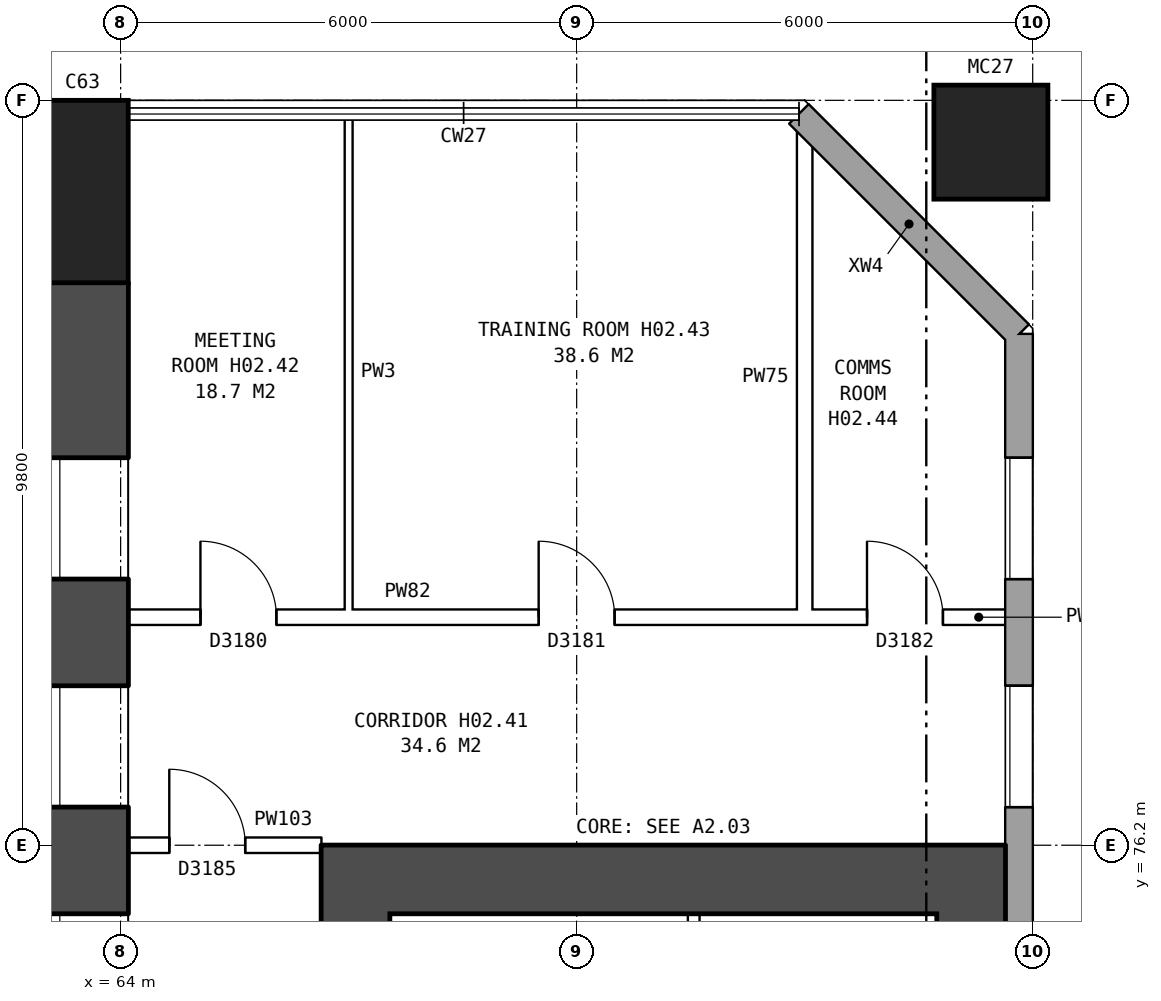
"""IFC4 building model, lengths in metres.
Left out: names, types, materials, properties, quantities, classifications, styles, units other than length and angle.
Written with IfcOpenShell. Run it as: python <this file> out.ifc"""

import sys

from ifc_helpers import new_model, si_unit, direction, frame, frame_2d, origin, origin_2d, place, context, subcontext, project, spatial, rectangle, hollow_rectangle, extrude, element, fill, save


model = new_model("IFC4")
c1 = context("Model", 3, precision=1e-05, world=origin(), true_north=direction((0.0, 1.0)))
c2 = subcontext(c1, "Body", "Model", "MODEL_VIEW")
j1 = project(units=[si_unit("LENGTHUNIT", "METRE"), si_unit("PLANEANGLEUNIT", "RADIAN")], contexts=[c1])
p1 = place(None, origin())
s1 = spatial("IfcSite", under=j1, at=p1, CompositionType="ELEMENT")
p2 = place(p1, origin())
s2 = spatial("IfcBuilding", under=s1, at=p2, CompositionType="ELEMENT")
p3 = place(p2, frame((0.0, 0.0, 10.1)))
s3 = spatial("IfcBuildingStorey", under=s2, at=p3, CompositionType="ELEMENT", Elevation=10.1)
p4 = place(p3, frame((63.5, 84.8, -0.3), z_axis=(0.0, 0.0, 1.0), x_axis=(1.0, 0.0, 0.0)))
e1 = element("IfcColumn", 1, at=p4, inside=s3, PredefinedType="COLUMN", context=c2, shape_type="SweptSolid", body=[
    extrude(rectangle(XDim=1.2, YDim=2.4, at=origin_2d()), origin(), (0.0, 0.0, 1.0), 4.4),
])
p5 = place(p3, frame((63.5, 56.4, -0.3), z_axis=(0.0, 0.0, 1.0), x_axis=(0.0, 1.0, 0.0)))
e2 = element("IfcWall", 2, at=p5, inside=s3, PredefinedType="SHEAR", context=c2, shape_type="SweptSolid", body=[
    extrude(rectangle(XDim=27.2, YDim=1.2, at=frame_2d((13.6, 0.0))), origin(), (0.0, 0.0, 1.0), 4.4),
])
p6 = place(p5, frame((2.3, 0.0, 0.8)))
e3 = element("IfcOpeningElement", 3, at=p6, cuts=e2, PredefinedType="OPENING", context=c2, shape_type="SweptSolid", body=[
    extrude(rectangle(XDim=1.6, YDim=1.8, at=frame_2d((0.8, 0.9))), frame((0.0, 0.61, 0.0), z_axis=(0.0, -1.0, 0.0), x_axis=(1.0, 0.0, 0.0)), (0.0, 0.0, 1.0), 1.22),
])
p7 = place(p5, frame((5.3, 0.0, 0.8)))
e4 = element("IfcOpeningElement", 4, at=p7, cuts=e2, PredefinedType="OPENING", context=c2, shape_type="SweptSolid", body=[
    extrude(rectangle(XDim=1.6, YDim=1.8, at=frame_2d((0.8, 0.9))), frame((0.0, 0.61, 0.0), z_axis=(0.0, -1.0, 0.0), x_axis=(1.0, 0.0, 0.0)), (0.0, 0.0, 1.0), 1.22),
])
p8 = place(p5, frame((8.3, 0.0, 0.8)))
e5 = element("IfcOpeningElement", 5, at=p8, cuts=e2, PredefinedType="OPENING", context=c2, shape_type="SweptSolid", body=[
    extrude(rectangle(XDim=1.6, YDim=1.8, at=frame_2d((0.8, 0.9))), frame((0.0, 0.61, 0.0), z_axis=(0.0, -1.0, 0.0), x_axis=(1.0, 0.0, 0.0)), (0.0, 0.0, 1.0), 1.22),
])
p9 = place(p5, frame((11.3, 0.0, 0.8)))
e6 = element("IfcOpeningElement", 6, at=p9, cuts=e2, PredefinedType="OPENING", context=c2, shape_type="SweptSolid", body=[
    extrude(rectangle(XDim=1.6, YDim=1.8, at=frame_2d((0.8, 0.9))), frame((0.0, 0.61, 0.0), z_axis=(0.0, -1.0, 0.0), x_axis=(1.0, 0.0, 0.0)), (0.0, 0.0, 1.0), 1.22),
])
p10 = place(p5, frame((14.3, 0.0, 0.8)))
e7 = element("IfcOpeningElement", 7, at=p10, cuts=e2, PredefinedType="OPENING", context=c2, shape_type="SweptSolid", body=[
    extrude(rectangle(XDim=1.6, YDim=1.8, at=frame_2d((0.8, 0.9))), frame((0.0, 0.61, 0.0), z_axis=(0.0, -1.0, 0.0), x_axis=(1.0, 0.0, 0.0)), (0.0, 0.0, 1.0), 1.22),
])
p11 = place(p5, frame((17.3, 0.0, 0.8)))
e8 = element("IfcOpeningElement", 8, at=p11, cuts=e2, PredefinedType="OPENING", context=c2, shape_type="SweptSolid", body=[
    extrude(rectangle(XDim=1.6, YDim=1.8, at=frame_2d((0.8, 0.9))), frame((0.0, 0.61, 0.0), z_axis=(0.0, -1.0, 0.0), x_axis=(1.0, 0.0, 0.0)), (0.0, 0.0, 1.0), 1.22),
])
p12 = place(p5, frame((20.3, 0.0, 0.8)))
e9 = element("IfcOpeningElement", 9, at=p12, cuts=e2, PredefinedType="OPENING", context=c2, shape_type="SweptSolid", body=[
    extrude(rectangle(XDim=1.6, YDim=1.8, at=frame_2d((0.8, 0.9))), frame((0.0, 0.61, 0.0), z_axis=(0.0, -1.0, 0.0), x_axis=(1.0, 0.0, 0.0)), (0.0, 0.0, 1.0), 1.22),
])
p13 = place(p5, frame((23.3, 0.0, 0.8)))
e10 = element("IfcOpeningElement", 10, at=p13, cuts=e2, PredefinedType="OPENING", context=c2, shape_type="SweptSolid", body=[
    extrude(rectangle(XDim=1.6, YDim=1.8, at=frame_2d((0.8, 0.9))), frame((0.0, 0.61, 0.0), z_axis=(0.0, -1.0, 0.0), x_axis=(1.0, 0.0, 0.0)), (0.0, 0.0, 1.0), 1.22),
])
p14 = place(p3, frame((75.45, 85.45, 0.0), z_axis=(0.0, 0.0, 1.0), x_axis=(1.0, 0.0, 0.0)))
e11 = element("IfcColumn", 11, at=p14, inside=s3, PredefinedType="COLUMN", context=c2, shape_type="SweptSolid", body=[
    extrude(hollow_rectangle(XDim=1.5, YDim=1.5, WallThickness=0.08, at=origin_2d()), origin(), (0.0, 0.0, 1.0), 4.6),
])
p15 = place(p3, frame((75.82, 57.075, 0.0), z_axis=(0.0, 0.0, 1.0), x_axis=(0.0, 1.0, 0.0)))
e12 = element("IfcWall", 12, at=p15, inside=s3, PredefinedType="STANDARD", context=c2, shape_type="SweptSolid", body=[
    extrude(rectangle(XDim=25.851, YDim=0.36, at=frame_2d((12.925, 0.0))), origin(), (0.0, 0.0, 1.0), 4.3),
])
p16 = place(p15, frame((1.625, 0.0, 0.8)))
e13 = element("IfcOpeningElement", 13, at=p16, cuts=e12, PredefinedType="OPENING", context=c2, shape_type="SweptSolid", body=[
    extrude(rectangle(XDim=1.6, YDim=1.8, at=frame_2d((0.8, 0.9))), frame((0.0, 0.19, 0.0), z_axis=(0.0, -1.0, 0.0), x_axis=(1.0, 0.0, 0.0)), (0.0, 0.0, 1.0), 0.38),
])
p17 = place(p15, frame((4.625, 0.0, 0.8)))
e14 = element("IfcOpeningElement", 14, at=p17, cuts=e12, PredefinedType="OPENING", context=c2, shape_type="SweptSolid", body=[
    extrude(rectangle(XDim=1.6, YDim=1.8, at=frame_2d((0.8, 0.9))), frame((0.0, 0.19, 0.0), z_axis=(0.0, -1.0, 0.0), x_axis=(1.0, 0.0, 0.0)), (0.0, 0.0, 1.0), 0.38),
])
p18 = place(p15, frame((19.625, 0.0, 0.8)))
e15 = element("IfcOpeningElement", 15, at=p18, cuts=e12, PredefinedType="OPENING", context=c2, shape_type="SweptSolid", body=[
    extrude(rectangle(XDim=1.6, YDim=1.8, at=frame_2d((0.8, 0.9))), frame((0.0, 0.19, 0.0), z_axis=(0.0, -1.0, 0.0), x_axis=(1.0, 0.0, 0.0)), (0.0, 0.0, 1.0), 0.38),
])
p19 = place(p15, frame((22.625, 0.0, 0.8)))
e16 = element("IfcOpeningElement", 16, at=p19, cuts=e12, PredefinedType="OPENING", context=c2, shape_type="SweptSolid", body=[
    extrude(rectangle(XDim=1.6, YDim=1.8, at=frame_2d((0.8, 0.9))), frame((0.0, 0.19, 0.0), z_axis=(0.0, -1.0, 0.0), x_axis=(1.0, 0.0, 0.0)), (0.0, 0.0, 1.0), 0.38),
])
p20 = place(p3, frame((75.82, 82.925, 0.0), z_axis=(0.0, 0.0, 1.0), x_axis=(-0.707106781187, 0.707106781187, 0.0)))
e17 = element("IfcWall", 17, at=p20, inside=s3, PredefinedType="STANDARD", context=c2, shape_type="SweptSolid", body=[
    extrude(rectangle(XDim=4.094, YDim=0.36, at=frame_2d((2.047, 0.0))), origin(), (0.0, 0.0, 1.0), 4.3),
])
p21 = place(p3, frame((67.09, 64.7, 0.0), z_axis=(0.0, 0.0, 1.0), x_axis=(0.0, 1.0, 0.0)))
e18 = element("IfcWall", 18, at=p21, inside=s3, PredefinedType="SHEAR", context=c2, shape_type="SweptSolid", body=[
    extrude(rectangle(XDim=10.6, YDim=0.9, at=frame_2d((5.3, 0.0))), origin(), (0.0, 0.0, 1.0), 4.3),
])
p22 = place(p21, frame((0.425, 0.0, 0.0)))
e19 = element("IfcOpeningElement", 19, at=p22, cuts=e18, PredefinedType="OPENING", context=c2, shape_type="SweptSolid", body=[
    extrude(rectangle(XDim=1.1, YDim=2.1, at=frame_2d((0.55, 1.05))), frame((0.0, 0.46, 0.0), z_axis=(0.0, -1.0, 0.0), x_axis=(1.0, 0.0, 0.0)), (0.0, 0.0, 1.0), 0.92),
])
p23 = place(p21, frame((9.0, 0.0, 0.0)))
e20 = element("IfcOpeningElement", 20, at=p23, cuts=e18, PredefinedType="OPENING", context=c2, shape_type="SweptSolid", body=[
    extrude(rectangle(XDim=1.1, YDim=2.1, at=frame_2d((0.55, 1.05))), frame((0.0, 0.46, 0.0), z_axis=(0.0, -1.0, 0.0), x_axis=(1.0, 0.0, 0.0)), (0.0, 0.0, 1.0), 0.92),
])
p24 = place(p3, frame((75.19, 64.7, 0.0), z_axis=(0.0, 0.0, 1.0), x_axis=(0.0, 1.0, 0.0)))
e21 = element("IfcWall", 21, at=p24, inside=s3, PredefinedType="SHEAR", context=c2, shape_type="SweptSolid", body=[
    extrude(rectangle(XDim=10.6, YDim=0.9, at=frame_2d((5.3, 0.0))), origin(), (0.0, 0.0, 1.0), 4.3),
])
p25 = place(p3, frame((66.64, 75.75, 0.0), z_axis=(0.0, 0.0, 1.0), x_axis=(1.0, 0.0, 0.0)))
e22 = element("IfcWall", 22, at=p25, inside=s3, PredefinedType="SHEAR", context=c2, shape_type="SweptSolid", body=[
    extrude(rectangle(XDim=9.0, YDim=0.9, at=frame_2d((4.5, 0.0))), origin(), (0.0, 0.0, 1.0), 4.3),
])
p26 = place(p3, frame((71.54, 73.45, 0.0), z_axis=(0.0, 0.0, 1.0), x_axis=(0.0, 1.0, 0.0)))
e23 = element("IfcWall", 23, at=p26, inside=s3, PredefinedType="PARTITIONING", context=c2, shape_type="SweptSolid", body=[
    extrude(rectangle(XDim=1.85, YDim=0.15, at=frame_2d((0.925, 0.0))), origin(), (0.0, 0.0, 1.0), 4.3),
])
p27 = place(p26, frame((0.5, 0.0, 0.0)))
e24 = element("IfcOpeningElement", 24, at=p27, cuts=e23, PredefinedType="OPENING", context=c2, shape_type="SweptSolid", body=[
    extrude(rectangle(XDim=0.85, YDim=2.1, at=frame_2d((0.425, 1.05))), frame((0.0, 0.085, 0.0), z_axis=(0.0, -1.0, 0.0), x_axis=(1.0, 0.0, 0.0)), (0.0, 0.0, 1.0), 0.17),
])
p28 = place(p3, frame((64.1, 76.2, 0.0), z_axis=(0.0, 0.0, 1.0), x_axis=(1.0, 0.0, 0.0)))
e25 = element("IfcWall", 25, at=p28, inside=s3, PredefinedType="PARTITIONING", context=c2, shape_type="SweptSolid", body=[
    extrude(rectangle(XDim=2.54, YDim=0.2, at=frame_2d((1.27, 0.0))), origin(), (0.0, 0.0, 1.0), 4.3),
])
p29 = place(p28, frame((0.54, 0.0, 0.0)))
e26 = element("IfcOpeningElement", 26, at=p29, cuts=e25, PredefinedType="OPENING", context=c2, shape_type="SweptSolid", body=[
    extrude(rectangle(XDim=1.0, YDim=2.1, at=frame_2d((0.5, 1.05))), frame((0.0, 0.11, 0.0), z_axis=(0.0, -1.0, 0.0), x_axis=(1.0, 0.0, 0.0)), (0.0, 0.0, 1.0), 0.22),
])
p30 = place(p3, frame((72.9, 79.2, 0.0), z_axis=(0.0, 0.0, 1.0), x_axis=(1.0, 0.0, 0.0)))
e27 = element("IfcWall", 27, at=p30, inside=s3, PredefinedType="PARTITIONING", context=c2, shape_type="SweptSolid", body=[
    extrude(rectangle(XDim=2.86, YDim=0.2, at=frame_2d((1.43, 0.0))), origin(), (0.0, 0.0, 1.0), 4.3),
])
p31 = place(p30, frame((0.92, 0.0, 0.0)))
e28 = element("IfcOpeningElement", 28, at=p31, cuts=e27, PredefinedType="OPENING", context=c2, shape_type="SweptSolid", body=[
    extrude(rectangle(XDim=1.0, YDim=2.1, at=frame_2d((0.5, 1.05))), frame((0.0, 0.11, 0.0), z_axis=(0.0, -1.0, 0.0), x_axis=(1.0, 0.0, 0.0)), (0.0, 0.0, 1.0), 0.22),
])
p32 = place(p3, frame((63.98, 79.2, 0.0), z_axis=(0.0, 0.0, 1.0), x_axis=(1.0, 0.0, 0.0)))
e29 = element("IfcWall", 29, at=p32, inside=s3, PredefinedType="PARTITIONING", context=c2, shape_type="SweptSolid", body=[
    extrude(rectangle(XDim=9.12, YDim=0.2, at=frame_2d((4.56, 0.0))), origin(), (0.0, 0.0, 1.0), 4.3),
])
p33 = place(p32, frame((1.07, 0.0, 0.0)))
e30 = element("IfcOpeningElement", 30, at=p33, cuts=e29, PredefinedType="OPENING", context=c2, shape_type="SweptSolid", body=[
    extrude(rectangle(XDim=1.0, YDim=2.1, at=frame_2d((0.5, 1.05))), frame((0.0, 0.11, 0.0), z_axis=(0.0, -1.0, 0.0), x_axis=(1.0, 0.0, 0.0)), (0.0, 0.0, 1.0), 0.22),
])
p34 = place(p32, frame((5.52, 0.0, 0.0)))
e31 = element("IfcOpeningElement", 31, at=p34, cuts=e29, PredefinedType="OPENING", context=c2, shape_type="SweptSolid", body=[
    extrude(rectangle(XDim=1.0, YDim=2.1, at=frame_2d((0.5, 1.05))), frame((0.0, 0.11, 0.0), z_axis=(0.0, -1.0, 0.0), x_axis=(1.0, 0.0, 0.0)), (0.0, 0.0, 1.0), 0.22),
])
p35 = place(p3, frame((67.0, 79.1, 0.0), z_axis=(0.0, 0.0, 1.0), x_axis=(0.0, 1.0, 0.0)))
e32 = element("IfcWall", 32, at=p35, inside=s3, PredefinedType="PARTITIONING", context=c2, shape_type="SweptSolid", body=[
    extrude(rectangle(XDim=6.66, YDim=0.1, at=frame_2d((3.33, 0.0))), origin(), (0.0, 0.0, 1.0), 4.3),
])
p36 = place(p3, frame((73.0, 79.1, 0.0), z_axis=(0.0, 0.0, 1.0), x_axis=(0.0, 1.0, 0.0)))
e33 = element("IfcWall", 33, at=p36, inside=s3, PredefinedType="PARTITIONING", context=c2, shape_type="SweptSolid", body=[
    extrude(rectangle(XDim=6.511, YDim=0.2, at=frame_2d((3.255, 0.0))), origin(), (0.0, 0.0, 1.0), 4.3),
])
p37 = place(p18, origin())
e34 = element("IfcWindow", 34, at=p37, inside=s3, PartitioningType="SINGLE_PANEL", PredefinedType="WINDOW", context=c2, shape_type="SweptSolid", body=[
    extrude(rectangle(XDim=1.6, YDim=1.8, at=frame_2d((0.8, 0.9))), frame((0.0, 0.15, 0.0), z_axis=(0.0, -1.0, 0.0), x_axis=(1.0, 0.0, 0.0)), (0.0, 0.0, 1.0), 0.06),
])
fill(e15, e34)
p38 = place(p19, origin())
e35 = element("IfcWindow", 35, at=p38, inside=s3, PartitioningType="SINGLE_PANEL", PredefinedType="WINDOW", context=c2, shape_type="SweptSolid", body=[
    extrude(rectangle(XDim=1.6, YDim=1.8, at=frame_2d((0.8, 0.9))), frame((0.0, 0.15, 0.0), z_axis=(0.0, -1.0, 0.0), x_axis=(1.0, 0.0, 0.0)), (0.0, 0.0, 1.0), 0.06),
])
fill(e16, e35)
p39 = place(p11, origin())
e36 = element("IfcWindow", 36, at=p39, inside=s3, PartitioningType="SINGLE_PANEL", PredefinedType="WINDOW", context=c2, shape_type="SweptSolid", body=[
    extrude(rectangle(XDim=1.6, YDim=1.8, at=frame_2d((0.8, 0.9))), frame((0.0, 0.33, 0.0), z_axis=(0.0, -1.0, 0.0), x_axis=(1.0, 0.0, 0.0)), (0.0, 0.0, 1.0), 0.06),
])
fill(e8, e36)
p40 = place(p12, origin())
e37 = element("IfcWindow", 37, at=p40, inside=s3, PartitioningType="SINGLE_PANEL", PredefinedType="WINDOW", context=c2, shape_type="SweptSolid", body=[
    extrude(rectangle(XDim=1.6, YDim=1.8, at=frame_2d((0.8, 0.9))), frame((0.0, 0.33, 0.0), z_axis=(0.0, -1.0, 0.0), x_axis=(1.0, 0.0, 0.0)), (0.0, 0.0, 1.0), 0.06),
])
fill(e9, e37)
p41 = place(p13, origin())
e38 = element("IfcWindow", 38, at=p41, inside=s3, PartitioningType="SINGLE_PANEL", PredefinedType="WINDOW", context=c2, shape_type="SweptSolid", body=[
    extrude(rectangle(XDim=1.6, YDim=1.8, at=frame_2d((0.8, 0.9))), frame((0.0, 0.33, 0.0), z_axis=(0.0, -1.0, 0.0), x_axis=(1.0, 0.0, 0.0)), (0.0, 0.0, 1.0), 0.06),
])
fill(e10, e38)
p42 = place(p29, origin())
e39 = element("IfcDoor", 39, at=p42, inside=s3, OperationType="SINGLE_SWING_LEFT", PredefinedType="DOOR", context=c2, shape_type="SweptSolid", body=[
    extrude(rectangle(XDim=1.0, YDim=2.1, at=frame_2d((0.5, 1.05))), frame((0.0, 0.025, 0.0), z_axis=(0.0, -1.0, 0.0), x_axis=(1.0, 0.0, 0.0)), (0.0, 0.0, 1.0), 0.05),
])
fill(e26, e39)
p43 = place(p31, origin())
e40 = element("IfcDoor", 40, at=p43, inside=s3, OperationType="SINGLE_SWING_LEFT", PredefinedType="DOOR", context=c2, shape_type="SweptSolid", body=[
    extrude(rectangle(XDim=1.0, YDim=2.1, at=frame_2d((0.5, 1.05))), frame((0.0, 0.025, 0.0), z_axis=(0.0, -1.0, 0.0), x_axis=(1.0, 0.0, 0.0)), (0.0, 0.0, 1.0), 0.05),
])
fill(e28, e40)
p44 = place(p33, origin())
e41 = element("IfcDoor", 41, at=p44, inside=s3, OperationType="SINGLE_SWING_LEFT", PredefinedType="DOOR", context=c2, shape_type="SweptSolid", body=[
    extrude(rectangle(XDim=1.0, YDim=2.1, at=frame_2d((0.5, 1.05))), frame((0.0, 0.025, 0.0), z_axis=(0.0, -1.0, 0.0), x_axis=(1.0, 0.0, 0.0)), (0.0, 0.0, 1.0), 0.05),
])
fill(e30, e41)
p45 = place(p34, origin())
e42 = element("IfcDoor", 42, at=p45, inside=s3, OperationType="SINGLE_SWING_LEFT", PredefinedType="DOOR", context=c2, shape_type="SweptSolid", body=[
    extrude(rectangle(XDim=1.0, YDim=2.1, at=frame_2d((0.5, 1.05))), frame((0.0, 0.025, 0.0), z_axis=(0.0, -1.0, 0.0), x_axis=(1.0, 0.0, 0.0)), (0.0, 0.0, 1.0), 0.05),
])
fill(e31, e42)
save(model, sys.argv[1])
